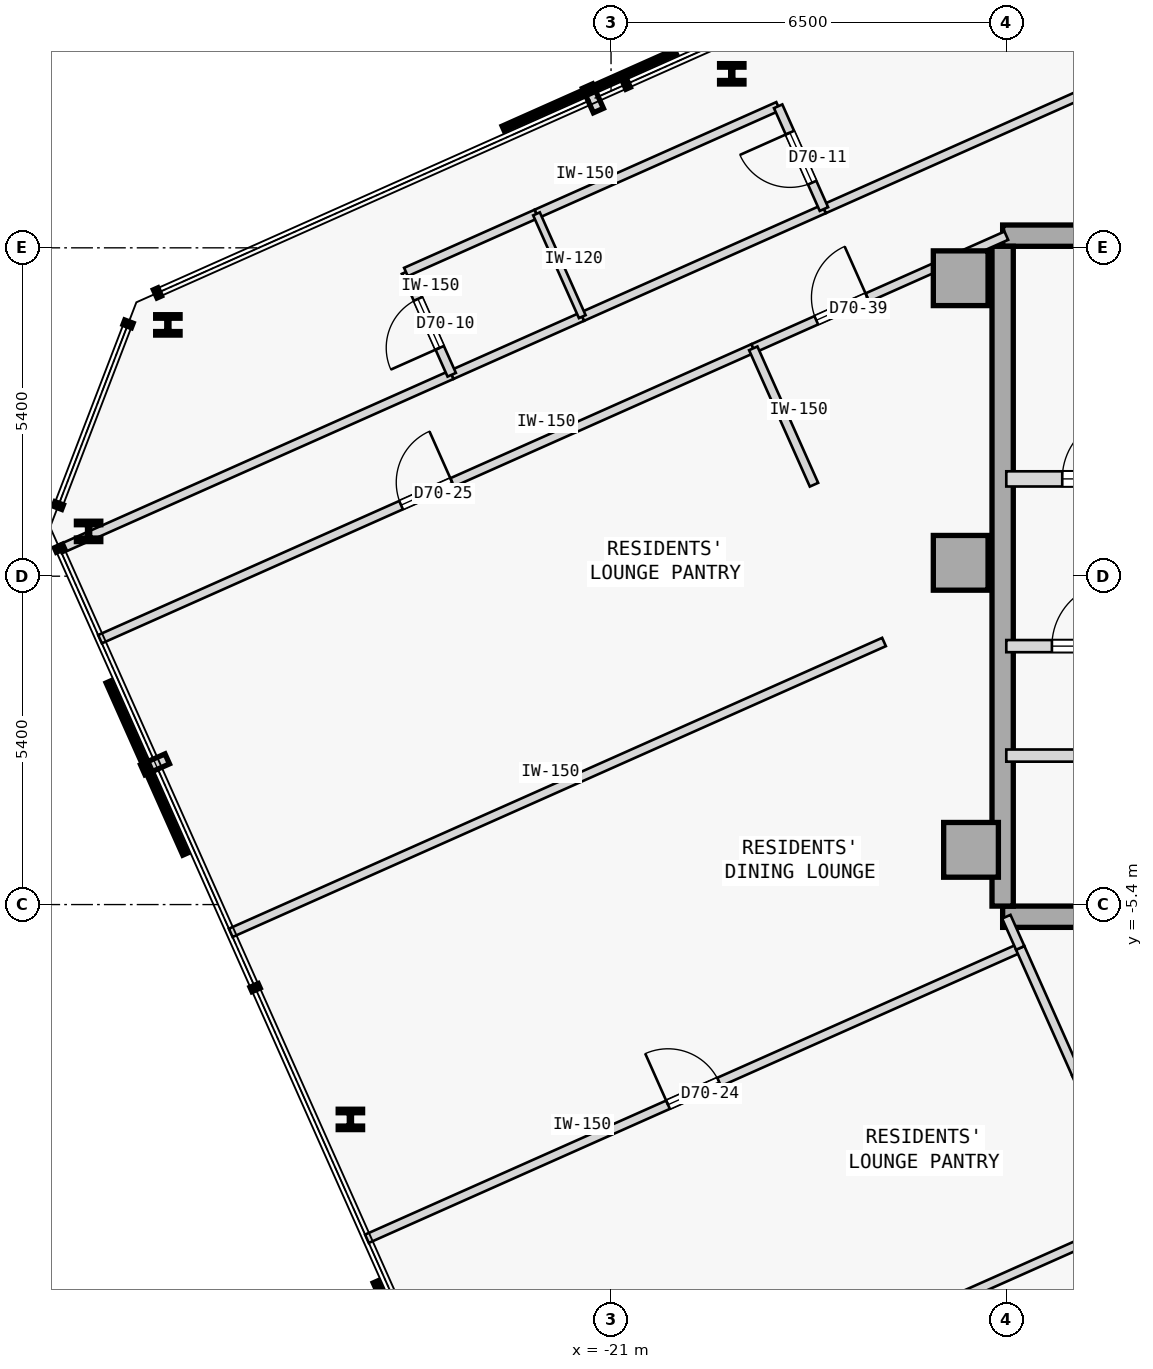
"""IFC4 building model, lengths in metres.
Left out: names, types, materials, properties, quantities, classifications, styles, units other than length and angle.
Written with IfcOpenShell. Run it as: python <this file> out.ifc"""

import sys

from ifc_helpers import new_model, si_unit, direction, frame, frame_2d, origin, origin_2d, place, context, subcontext, project, spatial, rectangle, i_section, extrude, element, fill, save


model = new_model("IFC4")
c1 = context("Model", 3, precision=1e-05, world=origin(), true_north=direction((0.0, 1.0)))
c2 = subcontext(c1, "Body", "Model", "MODEL_VIEW")
j1 = project(units=[si_unit("LENGTHUNIT", "METRE"), si_unit("PLANEANGLEUNIT", "RADIAN")], contexts=[c1])
p1 = place(None, origin())
s1 = spatial("IfcSite", under=j1, at=p1, CompositionType="ELEMENT")
p2 = place(p1, origin())
s2 = spatial("IfcBuilding", under=s1, at=p2, CompositionType="ELEMENT")
p3 = place(p2, frame((0.0, 0.0, 262.2)))
s3 = spatial("IfcBuildingStorey", under=s2, at=p3, CompositionType="ELEMENT", Elevation=262.2)
for number, where, z_axis, x_axis in (
    (1, (-15.25, 4.9, 0.0), (0.0, 0.0, 1.0), (1.0, 0.0, 0.0)),
    (2, (-15.25, 0.22, 0.0), (0.0, 0.0, 1.0), (1.0, 0.0, 0.0)),
    (3, (-15.08, -4.5, 0.0), (0.0, 0.0, 1.0), (1.0, 0.0, 0.0)),
):
    element("IfcColumn", number, at=place(p3, frame(where, z_axis=z_axis, x_axis=x_axis)), inside=s3, PredefinedType="COLUMN", context=c2, shape_type="SweptSolid", body=[
        extrude(rectangle(XDim=0.9, YDim=0.9, at=origin_2d()), origin(), (0.0, 0.0, 1.0), 3.35),
    ])
p4 = place(p3, frame((-14.56, 5.6, 0.0), z_axis=(0.0, 0.0, 1.0), x_axis=(1.0, 0.0, 0.0)))
e4 = element("IfcWall", 4, at=p4, inside=s3, PredefinedType="SHEAR", context=c2, shape_type="SweptSolid", body=[
    extrude(rectangle(XDim=11.41, YDim=0.35, at=frame_2d((5.705, 0.0))), origin(), (0.0, 0.0, 1.0), 3.125),
])
p5 = place(p3, frame((-14.56, -5.6, 0.0), z_axis=(0.0, 0.0, 1.0), x_axis=(1.0, 0.0, 0.0)))
e5 = element("IfcWall", 5, at=p5, inside=s3, PredefinedType="SHEAR", context=c2, shape_type="SweptSolid", body=[
    extrude(rectangle(XDim=10.86, YDim=0.35, at=frame_2d((5.43, 0.0))), origin(), (0.0, 0.0, 1.0), 3.125),
])
p6 = place(p3, frame((-14.56, -5.425, 0.0), z_axis=(0.0, 0.0, 1.0), x_axis=(0.0, 1.0, 0.0)))
e6 = element("IfcWall", 6, at=p6, inside=s3, PredefinedType="SHEAR", context=c2, shape_type="SweptSolid", body=[
    extrude(rectangle(XDim=10.85, YDim=0.35, at=frame_2d((5.425, 0.0))), origin(), (0.0, 0.0, 1.0), 3.125),
])
for number, where, z_axis, x_axis in (
    (7, (-19.015, 8.262, 0.0), (0.0, 0.0, 1.0), (1.0, 0.0, 0.0)),
    (8, (-28.288, 4.133, 0.0), (0.0, 0.0, 1.0), (1.0, 0.0, 0.0)),
    (9, (-29.592, 0.737, 0.0), (0.0, 0.0, 1.0), (1.0, 0.0, 0.0)),
    (10, (-25.286, -8.933, 0.0), (0.0, 0.0, 1.0), (1.0, 0.0, 0.0)),
):
    element("IfcColumn", number, at=place(p3, frame(where, z_axis=z_axis, x_axis=x_axis)), inside=s3, PredefinedType="COLUMN", context=c2, shape_type="SweptSolid", body=[
        extrude(i_section(OverallWidth=0.401, OverallDepth=0.335, WebThickness=0.036, FlangeThickness=0.058, FilletRadius=0.015, at=origin_2d()), origin(), (0.0, 0.0, 1.0), 3.35),
    ])
p7 = place(p3, frame((-14.5, 1.6, 0.0), z_axis=(0.0, 0.0, 1.0), x_axis=(1.0, 0.0, 0.0)))
e11 = element("IfcWall", 11, at=p7, inside=s3, PredefinedType="STANDARD", context=c2, shape_type="SweptSolid", body=[
    extrude(rectangle(XDim=3.6, YDim=0.25, at=frame_2d((1.8, 0.0))), origin(), (0.0, 0.0, 1.0), 3.125),
])
p8 = place(p7, frame((0.92, 0.0, 0.0)))
e12 = element("IfcOpeningElement", 12, at=p8, cuts=e11, PredefinedType="OPENING", context=c2, shape_type="SweptSolid", body=[
    extrude(rectangle(XDim=1.05, YDim=2.15, at=frame_2d((0.525, 1.075))), frame((0.0, 0.135, 0.0), z_axis=(0.0, -1.0, 0.0), x_axis=(1.0, 0.0, 0.0)), (0.0, 0.0, 1.0), 0.27),
])
p9 = place(p3, frame((-14.5, -1.15, 0.0), z_axis=(0.0, 0.0, 1.0), x_axis=(1.0, 0.0, 0.0)))
e13 = element("IfcWall", 13, at=p9, inside=s3, PredefinedType="STANDARD", context=c2, shape_type="SweptSolid", body=[
    extrude(rectangle(XDim=2.95, YDim=0.2, at=frame_2d((1.475, 0.0))), origin(), (0.0, 0.0, 1.0), 3.125),
])
p10 = place(p9, frame((0.75, 0.0, 0.0)))
e14 = element("IfcOpeningElement", 14, at=p10, cuts=e13, PredefinedType="OPENING", context=c2, shape_type="SweptSolid", body=[
    extrude(rectangle(XDim=1.05, YDim=2.18, at=frame_2d((0.525, 1.09))), frame((0.0, 0.11, 0.0), z_axis=(0.0, -1.0, 0.0), x_axis=(1.0, 0.0, 0.0)), (0.0, 0.0, 1.0), 0.22),
])
p11 = place(p3, frame((-14.5, -2.95, 0.0), z_axis=(0.0, 0.0, 1.0), x_axis=(1.0, 0.0, 0.0)))
e15 = element("IfcWall", 15, at=p11, inside=s3, PredefinedType="STANDARD", context=c2, shape_type="SweptSolid", body=[
    extrude(rectangle(XDim=10.8, YDim=0.2, at=frame_2d((5.4, 0.0))), origin(), (0.0, 0.0, 1.0), 3.125),
])
p12 = place(p11, frame((9.17, 0.0, 0.0)))
e16 = element("IfcOpeningElement", 16, at=p12, cuts=e15, PredefinedType="OPENING", context=c2, shape_type="SweptSolid", body=[
    extrude(rectangle(XDim=1.1, YDim=2.15, at=frame_2d((0.55, 1.075))), frame((0.0, 0.11, 0.0), z_axis=(0.0, -1.0, 0.0), x_axis=(1.0, 0.0, 0.0)), (0.0, 0.0, 1.0), 0.22),
])
p13 = place(p11, frame((2.33, 0.0, 0.0)))
e17 = element("IfcOpeningElement", 17, at=p13, cuts=e15, PredefinedType="OPENING", context=c2, shape_type="SweptSolid", body=[
    extrude(rectangle(XDim=0.92, YDim=2.15, at=frame_2d((0.46, 1.075))), frame((0.0, 0.11, 0.0), z_axis=(0.0, -1.0, 0.0), x_axis=(1.0, 0.0, 0.0)), (0.0, 0.0, 1.0), 0.22),
])
p14 = place(p11, frame((6.65, 0.0, 0.0)))
e18 = element("IfcOpeningElement", 18, at=p14, cuts=e15, PredefinedType="OPENING", context=c2, shape_type="SweptSolid", body=[
    extrude(rectangle(XDim=0.92, YDim=2.15, at=frame_2d((0.46, 1.075))), frame((0.0, 0.11, 0.0), z_axis=(0.0, -1.0, 0.0), x_axis=(1.0, 0.0, 0.0)), (0.0, 0.0, 1.0), 0.22),
])
p15 = place(p3, frame((-30.063, 0.444, 0.0), z_axis=(0.0, 0.0, 1.0), x_axis=(0.91354584652, 0.406735769642, 0.0)))
e19 = element("IfcWall", 19, at=p15, inside=s3, PredefinedType="PARTITIONING", context=c2, shape_type="SweptSolid", body=[
    extrude(rectangle(XDim=7.053, YDim=0.15, at=frame_2d((3.526, 0.0))), origin(), (0.0, 0.0, 1.0), 3.125),
])
p16 = place(p3, frame((-17.499, 6.038, 0.0), z_axis=(0.0, 0.0, 1.0), x_axis=(0.913541623157, 0.406745255362, 0.0)))
e20 = element("IfcWall", 20, at=p16, inside=s3, PredefinedType="PARTITIONING", context=c2, shape_type="SweptSolid", body=[
    extrude(rectangle(XDim=17.879, YDim=0.15, at=frame_2d((8.939, 0.0))), origin(), (0.0, 0.0, 1.0), 3.125),
])
p17 = place(p16, frame((8.465, 0.0, 0.0)))
e21 = element("IfcOpeningElement", 21, at=p17, cuts=e20, PredefinedType="OPENING", context=c2, shape_type="SweptSolid", body=[
    extrude(rectangle(XDim=0.95, YDim=2.15, at=frame_2d((0.475, 1.075))), frame((0.0, 0.085, 0.0), z_axis=(0.0, -1.0, 0.0), x_axis=(1.0, 0.0, 0.0)), (0.0, 0.0, 1.0), 0.17),
])
p18 = place(p3, frame((-23.62, 3.312, 0.0), z_axis=(0.0, 0.0, 1.0), x_axis=(0.913558622212, 0.406707073682, 0.0)))
e22 = element("IfcWall", 22, at=p18, inside=s3, PredefinedType="PARTITIONING", context=c2, shape_type="SweptSolid", body=[
    extrude(rectangle(XDim=2.35, YDim=0.15, at=frame_2d((1.175, 0.0))), origin(), (0.0, 0.0, 1.0), 3.125),
])
p19 = place(p3, frame((-21.473, 4.268, 0.0), z_axis=(0.0, 0.0, 1.0), x_axis=(0.913545193015, 0.406737237438, 0.0)))
e23 = element("IfcWall", 23, at=p19, inside=s3, PredefinedType="PARTITIONING", context=c2, shape_type="SweptSolid", body=[
    extrude(rectangle(XDim=4.35, YDim=0.15, at=frame_2d((2.175, 0.0))), origin(), (0.0, 0.0, 1.0), 3.125),
])
p20 = place(p3, frame((-29.404, -1.036, 0.0), z_axis=(0.0, 0.0, 1.0), x_axis=(0.913544247064, 0.406739362069, 0.0)))
e24 = element("IfcWall", 24, at=p20, inside=s3, PredefinedType="PARTITIONING", context=c2, shape_type="SweptSolid", body=[
    extrude(rectangle(XDim=11.76, YDim=0.15, at=frame_2d((5.88, 0.0))), origin(), (0.0, 0.0, 1.0), 3.125),
])
p21 = place(p20, frame((5.42, 0.0, 0.0)))
e25 = element("IfcOpeningElement", 25, at=p21, cuts=e24, PredefinedType="OPENING", context=c2, shape_type="SweptSolid", body=[
    extrude(rectangle(XDim=0.92, YDim=2.15, at=frame_2d((0.46, 1.075))), frame((0.0, 0.085, 0.0), z_axis=(0.0, -1.0, 0.0), x_axis=(1.0, 0.0, 0.0)), (0.0, 0.0, 1.0), 0.17),
])
p22 = place(p3, frame((-18.661, 3.747, 0.0), z_axis=(0.0, 0.0, 1.0), x_axis=(0.913535055583, 0.40676000568, 0.0)))
e26 = element("IfcWall", 26, at=p22, inside=s3, PredefinedType="PARTITIONING", context=c2, shape_type="SweptSolid", body=[
    extrude(rectangle(XDim=4.555, YDim=0.15, at=frame_2d((2.277, 0.0))), origin(), (0.0, 0.0, 1.0), 3.125),
])
p23 = place(p22, frame((1.134, 0.0, 0.0)))
e27 = element("IfcOpeningElement", 27, at=p23, cuts=e26, PredefinedType="OPENING", context=c2, shape_type="SweptSolid", body=[
    extrude(rectangle(XDim=0.92, YDim=2.15, at=frame_2d((0.46, 1.075))), frame((0.0, 0.085, 0.0), z_axis=(0.0, -1.0, 0.0), x_axis=(1.0, 0.0, 0.0)), (0.0, 0.0, 1.0), 0.17),
])
p24 = place(p3, frame((-23.62, 3.312, 0.0), z_axis=(0.0, 0.0, 1.0), x_axis=(-0.406701600856, 0.913561058639, 0.0)))
e28 = element("IfcWall", 28, at=p24, inside=s3, PredefinedType="PARTITIONING", context=c2, shape_type="SweptSolid", body=[
    extrude(rectangle(XDim=1.85, YDim=0.15, at=frame_2d((0.925, 0.0))), origin(), (0.0, 0.0, 1.0), 3.125),
])
p25 = place(p24, frame((0.485, 0.0, 0.0)))
e29 = element("IfcOpeningElement", 29, at=p25, cuts=e28, PredefinedType="OPENING", context=c2, shape_type="SweptSolid", body=[
    extrude(rectangle(XDim=0.88, YDim=2.15, at=frame_2d((0.44, 1.075))), frame((0.0, 0.085, 0.0), z_axis=(0.0, -1.0, 0.0), x_axis=(1.0, 0.0, 0.0)), (0.0, 0.0, 1.0), 0.17),
])
p26 = place(p3, frame((-24.373, 5.003, 0.0), z_axis=(0.0, 0.0, 1.0), x_axis=(0.913558622212, 0.406707073682, 0.0)))
e30 = element("IfcWall", 30, at=p26, inside=s3, PredefinedType="PARTITIONING", context=c2, shape_type="SweptSolid", body=[
    extrude(rectangle(XDim=2.35, YDim=0.15, at=frame_2d((1.175, 0.0))), origin(), (0.0, 0.0, 1.0), 3.125),
])
p27 = place(p3, frame((-22.226, 5.958, 0.0), z_axis=(0.0, 0.0, 1.0), x_axis=(0.913545193015, 0.406737237438, 0.0)))
e31 = element("IfcWall", 31, at=p27, inside=s3, PredefinedType="PARTITIONING", context=c2, shape_type="SweptSolid", body=[
    extrude(rectangle(XDim=4.35, YDim=0.15, at=frame_2d((2.175, 0.0))), origin(), (0.0, 0.0, 1.0), 3.125),
])
p28 = place(p3, frame((-17.499, 6.038, 0.0), z_axis=(0.0, 0.0, 1.0), x_axis=(-0.406701600856, 0.913561058639, 0.0)))
e32 = element("IfcWall", 32, at=p28, inside=s3, PredefinedType="PARTITIONING", context=c2, shape_type="SweptSolid", body=[
    extrude(rectangle(XDim=1.85, YDim=0.15, at=frame_2d((0.925, 0.0))), origin(), (0.0, 0.0, 1.0), 3.125),
])
p29 = place(p28, frame((0.475, 0.0, 0.0)))
e33 = element("IfcOpeningElement", 33, at=p29, cuts=e32, PredefinedType="OPENING", context=c2, shape_type="SweptSolid", body=[
    extrude(rectangle(XDim=0.9, YDim=2.15, at=frame_2d((0.45, 1.075))), frame((0.0, 0.085, 0.0), z_axis=(0.0, -1.0, 0.0), x_axis=(1.0, 0.0, 0.0)), (0.0, 0.0, 1.0), 0.17),
])
p30 = place(p3, frame((-21.473, 4.268, 0.0), z_axis=(0.0, 0.0, 1.0), x_axis=(-0.406701600856, 0.913561058639, 0.0)))
e34 = element("IfcWall", 34, at=p30, inside=s3, PredefinedType="PARTITIONING", context=c2, shape_type="SweptSolid", body=[
    extrude(rectangle(XDim=1.85, YDim=0.12, at=frame_2d((0.925, 0.0))), origin(), (0.0, 0.0, 1.0), 3.125),
])
p31 = place(p3, frame((-23.043, -15.323, 0.0), z_axis=(0.0, 0.0, 1.0), x_axis=(0.913547681516, 0.406731648137, 0.0)))
e35 = element("IfcWall", 35, at=p31, inside=s3, PredefinedType="PARTITIONING", context=c2, shape_type="SweptSolid", body=[
    extrude(rectangle(XDim=11.76, YDim=0.15, at=frame_2d((5.88, 0.0))), origin(), (0.0, 0.0, 1.0), 3.125),
])
p32 = place(p31, frame((5.42, 0.0, 0.0)))
e36 = element("IfcOpeningElement", 36, at=p32, cuts=e35, PredefinedType="OPENING", context=c2, shape_type="SweptSolid", body=[
    extrude(rectangle(XDim=0.92, YDim=2.15, at=frame_2d((0.46, 1.075))), frame((0.0, 0.085, 0.0), z_axis=(0.0, -1.0, 0.0), x_axis=(1.0, 0.0, 0.0)), (0.0, 0.0, 1.0), 0.17),
])
p33 = place(p3, frame((-25.014, -10.896, 0.0), z_axis=(0.0, 0.0, 1.0), x_axis=(0.913544247064, 0.406739362069, 0.0)))
e37 = element("IfcWall", 37, at=p33, inside=s3, PredefinedType="PARTITIONING", context=c2, shape_type="SweptSolid", body=[
    extrude(rectangle(XDim=11.76, YDim=0.15, at=frame_2d((5.88, 0.0))), origin(), (0.0, 0.0, 1.0), 3.125),
])
p34 = place(p33, frame((5.42, 0.0, 0.0)))
e38 = element("IfcOpeningElement", 38, at=p34, cuts=e37, PredefinedType="OPENING", context=c2, shape_type="SweptSolid", body=[
    extrude(rectangle(XDim=0.92, YDim=2.15, at=frame_2d((0.46, 1.075))), frame((0.0, 0.085, 0.0), z_axis=(0.0, -1.0, 0.0), x_axis=(1.0, 0.0, 0.0)), (0.0, 0.0, 1.0), 0.17),
])
p35 = place(p3, frame((-12.3, -10.54, 0.0), z_axis=(0.0, 0.0, 1.0), x_axis=(-0.406788806475, 0.913522231216, 0.0)))
e39 = element("IfcWall", 39, at=p35, inside=s3, PredefinedType="PARTITIONING", context=c2, shape_type="SweptSolid", body=[
    extrude(rectangle(XDim=2.577, YDim=0.15, at=frame_2d((1.289, 0.0))), origin(), (0.0, 0.0, 1.0), 3.125),
])
p36 = place(p3, frame((-13.348, -8.186, 0.0), z_axis=(0.0, 0.0, 1.0), x_axis=(-0.40673740295, 0.913545119324, 0.0)))
e40 = element("IfcWall", 40, at=p36, inside=s3, PredefinedType="PARTITIONING", context=c2, shape_type="SweptSolid", body=[
    extrude(rectangle(XDim=2.269, YDim=0.15, at=frame_2d((1.134, 0.0))), origin(), (0.0, 0.0, 1.0), 3.125),
])
p37 = place(p3, frame((-27.254, -5.865, 0.0), z_axis=(0.0, 0.0, 1.0), x_axis=(0.913547681516, 0.406731648137, 0.0)))
e41 = element("IfcWall", 41, at=p37, inside=s3, PredefinedType="PARTITIONING", context=c2, shape_type="SweptSolid", body=[
    extrude(rectangle(XDim=11.76, YDim=0.15, at=frame_2d((5.88, 0.0))), origin(), (0.0, 0.0, 1.0), 3.125),
])
p38 = place(p3, frame((-14.271, -6.113, 0.0), z_axis=(0.0, 0.0, 1.0), x_axis=(-0.406622099206, 0.913596447255, 0.0)))
e42 = element("IfcWall", 42, at=p38, inside=s3, PredefinedType="PARTITIONING", context=c2, shape_type="SweptSolid", body=[
    extrude(rectangle(XDim=0.562, YDim=0.15, at=frame_2d((0.281, 0.0))), origin(), (0.0, 0.0, 1.0), 3.125),
])
p39 = place(p3, frame((-17.663, 1.504, 0.0), z_axis=(0.0, 0.0, 1.0), x_axis=(-0.406747374275, 0.913540679729, 0.0)))
e43 = element("IfcWall", 43, at=p39, inside=s3, PredefinedType="PARTITIONING", context=c2, shape_type="SweptSolid", body=[
    extrude(rectangle(XDim=2.455, YDim=0.15, at=frame_2d((1.228, 0.0))), origin(), (0.0, 0.0, 1.0), 3.125),
])
p40 = place(p8, origin())
e44 = element("IfcDoor", 44, at=p40, inside=s3, OperationType="SINGLE_SWING_RIGHT", PredefinedType="DOOR", context=c2, shape_type="SweptSolid", body=[
    extrude(rectangle(XDim=1.05, YDim=2.15, at=frame_2d((0.525, 1.075))), frame((0.0, 0.025, 0.0), z_axis=(0.0, -1.0, 0.0), x_axis=(1.0, 0.0, 0.0)), (0.0, 0.0, 1.0), 0.05),
])
fill(e12, e44)
p41 = place(p10, origin())
e45 = element("IfcDoor", 45, at=p41, inside=s3, OperationType="SINGLE_SWING_RIGHT", PredefinedType="DOOR", context=c2, shape_type="SweptSolid", body=[
    extrude(rectangle(XDim=1.05, YDim=2.18, at=frame_2d((0.525, 1.09))), frame((0.0, 0.025, 0.0), z_axis=(0.0, -1.0, 0.0), x_axis=(1.0, 0.0, 0.0)), (0.0, 0.0, 1.0), 0.05),
])
fill(e14, e45)
p42 = place(p25, origin())
e46 = element("IfcDoor", 46, at=p42, inside=s3, OperationType="SINGLE_SWING_LEFT", PredefinedType="DOOR", context=c2, shape_type="SweptSolid", body=[
    extrude(rectangle(XDim=0.88, YDim=2.15, at=frame_2d((0.44, 1.075))), frame((0.0, 0.025, 0.0), z_axis=(0.0, -1.0, 0.0), x_axis=(1.0, 0.0, 0.0)), (0.0, 0.0, 1.0), 0.05),
])
fill(e29, e46)
p43 = place(p29, origin())
e47 = element("IfcDoor", 47, at=p43, inside=s3, OperationType="SINGLE_SWING_RIGHT", PredefinedType="DOOR", context=c2, shape_type="SweptSolid", body=[
    extrude(rectangle(XDim=0.9, YDim=2.15, at=frame_2d((0.45, 1.075))), frame((0.0, 0.025, 0.0), z_axis=(0.0, -1.0, 0.0), x_axis=(1.0, 0.0, 0.0)), (0.0, 0.0, 1.0), 0.05),
])
fill(e33, e47)
p44 = place(p34, origin())
e48 = element("IfcDoor", 48, at=p44, inside=s3, OperationType="SINGLE_SWING_LEFT", PredefinedType="DOOR", context=c2, shape_type="SweptSolid", body=[
    extrude(rectangle(XDim=0.92, YDim=2.15, at=frame_2d((0.46, 1.075))), frame((0.0, 0.025, 0.0), z_axis=(0.0, -1.0, 0.0), x_axis=(1.0, 0.0, 0.0)), (0.0, 0.0, 1.0), 0.05),
])
fill(e38, e48)
p45 = place(p21, origin())
e49 = element("IfcDoor", 49, at=p45, inside=s3, OperationType="SINGLE_SWING_RIGHT", PredefinedType="DOOR", context=c2, shape_type="SweptSolid", body=[
    extrude(rectangle(XDim=0.92, YDim=2.15, at=frame_2d((0.46, 1.075))), frame((0.0, 0.025, 0.0), z_axis=(0.0, -1.0, 0.0), x_axis=(1.0, 0.0, 0.0)), (0.0, 0.0, 1.0), 0.05),
])
fill(e25, e49)
p46 = place(p23, origin())
e50 = element("IfcDoor", 50, at=p46, inside=s3, OperationType="SINGLE_SWING_RIGHT", PredefinedType="DOOR", context=c2, shape_type="SweptSolid", body=[
    extrude(rectangle(XDim=0.92, YDim=2.15, at=frame_2d((0.46, 1.075))), frame((0.0, 0.025, 0.0), z_axis=(0.0, -1.0, 0.0), x_axis=(1.0, 0.0, 0.0)), (0.0, 0.0, 1.0), 0.05),
])
fill(e27, e50)
save(model, sys.argv[1])
